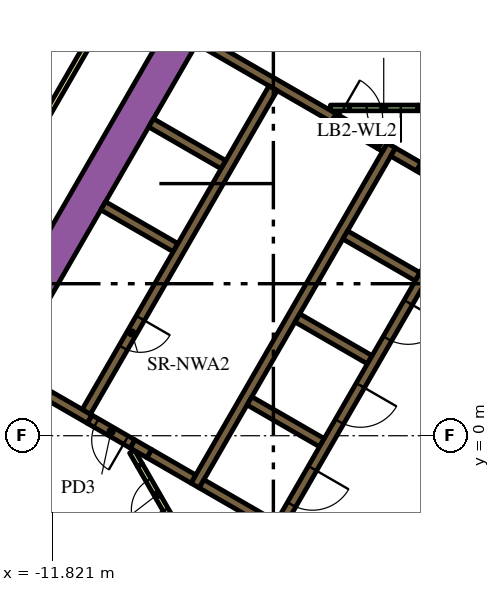
"""IFC4 building model, lengths in metres.
Left out: names, types, materials, properties, quantities, classifications, styles, units other than length and angle.
Written with IfcOpenShell. Run it as: python <this file> out.ifc"""

import sys

from ifc_helpers import new_model, si_unit, direction, frame, frame_2d, origin, place, context, subcontext, project, spatial, polyline, rectangle, outline, extrude, element, fill, save


model = new_model("IFC4")
c1 = context("Model", 3, precision=1e-05, world=origin(), true_north=direction((0.0, 1.0)))
c2 = subcontext(c1, "Body", "Model", "MODEL_VIEW")
j1 = project(units=[si_unit("LENGTHUNIT", "METRE"), si_unit("PLANEANGLEUNIT", "RADIAN")], contexts=[c1])
p1 = place(None, origin())
s1 = spatial("IfcSite", under=j1, at=p1, CompositionType="ELEMENT")
p2 = place(p1, origin())
s2 = spatial("IfcBuilding", under=s1, at=p2, CompositionType="ELEMENT")
p3 = place(p2, frame((0.0, 0.0, 126.6)))
s3 = spatial("IfcBuildingStorey", under=s2, at=p3, CompositionType="ELEMENT", Elevation=126.6)
p4 = place(p3, frame((-14.268, 0.387, 0.0), z_axis=(0.0, 0.0, 1.0), x_axis=(0.499994617707, 0.866028511231, 0.0)))
e1 = element("IfcWall", 1, at=p4, inside=s3, PredefinedType="SOLIDWALL", context=c2, shape_type="SweptSolid", body=[
    extrude(rectangle(XDim=18.817, YDim=0.9, at=frame_2d((9.409, 0.0))), origin(), (0.0, 0.0, 1.0), 3.9),
])
p5 = place(p3, frame((-8.06, -1.311, 0.0), z_axis=(0.0, 0.0, 1.0), x_axis=(0.50000273126, 0.866023826885, 0.0)))
e2 = element("IfcWall", 2, at=p5, inside=s3, PredefinedType="SOLIDWALL", context=c2, shape_type="SweptSolid", body=[
    extrude(rectangle(XDim=10.33, YDim=0.25, at=frame_2d((5.165, 0.0))), origin(), (0.0, 0.0, 1.0), 3.9),
])
p6 = place(p3, frame((-1.819, 6.87, 0.0), z_axis=(0.0, 0.0, 1.0), x_axis=(-0.866294599386, 0.499533449405, 0.0)))
e3 = element("IfcWall", 3, at=p6, inside=s3, PredefinedType="SOLIDWALL", context=c2, shape_type="SweptSolid", body=[
    extrude(rectangle(XDim=0.41, YDim=0.25, at=frame_2d((0.205, 0.0))), origin(), (0.0, 0.0, 1.0), 3.9),
])
p7 = place(p3, frame((-2.849, 7.465, 0.0), z_axis=(0.0, 0.0, 1.0), x_axis=(0.865955664968, -0.500120771724, 0.0)))
e4 = element("IfcWall", 4, at=p7, inside=s3, PredefinedType="SOLIDWALL", context=c2, shape_type="SweptSolid", body=[
    extrude(rectangle(XDim=0.778, YDim=0.25, at=frame_2d((0.389, 0.0))), origin(), (0.0, 0.0, 1.0), 3.9),
])
for number, where, z_axis, x_axis in (
    (5, (-2.204, 4.182, 0.0), (0.0, 0.0, 1.0), (-0.866, 0.5, 0.0)),
    (6, (-5.369, 3.1, 0.0), (0.0, 0.0, 1.0), (0.866, -0.5, 0.0)),
    (7, (-4.724, -0.182, 0.0), (0.0, 0.0, 1.0), (-0.866, 0.5, 0.0)),
):
    element("IfcWall", number, at=place(p3, frame(where, z_axis=z_axis, x_axis=x_axis)), inside=s3, PredefinedType="SOLIDWALL", context=c2, shape_type="SweptSolid", body=[
        extrude(rectangle(XDim=2.2, YDim=0.25, at=frame_2d((1.1, 0.0))), origin(), (0.0, 0.0, 1.0), 3.9),
    ])
p8 = place(p3, origin())
e8 = element("IfcWall", 8, at=p8, inside=s3, PredefinedType="SOLIDWALL", context=c2, shape_type="SweptSolid", body=[
    extrude(outline(polyline([(-5.922, -2.257), (-5.922, -2.257), (-5.705, -2.382), (-5.83, -2.598), (-6.418, -2.258), (-6.433, -2.153), (-6.433, -2.153), (-6.433, -2.153), (-6.508, -2.163), (-6.508, -2.163), (-6.508, -2.163), (-6.501, -2.21), (-7.952, -1.373), (-7.827, -1.156), (-5.922, -2.257)])), origin(), (0.0, 0.0, 1.0), 3.9),
])
p9 = place(p3, frame((-9.708, -0.215, 0.0), z_axis=(0.0, 0.0, 1.0), x_axis=(0.866113839764, -0.499846793097, 0.0)))
e9 = element("IfcWall", 9, at=p9, inside=s3, PredefinedType="SOLIDWALL", context=c2, shape_type="SweptSolid", body=[
    extrude(rectangle(XDim=0.51, YDim=0.25, at=frame_2d((0.255, 0.0))), origin(), (0.0, 0.0, 1.0), 3.9),
])
p10 = place(p3, frame((-12.999, 1.685, 0.0), z_axis=(0.0, 0.0, 1.0), x_axis=(0.865996765544, -0.500049599607, 0.0)))
e10 = element("IfcWall", 10, at=p10, inside=s3, PredefinedType="SOLIDWALL", context=c2, shape_type="SweptSolid", body=[
    extrude(rectangle(XDim=2.498, YDim=0.25, at=frame_2d((1.249, 0.0))), origin(), (0.0, 0.0, 1.0), 3.9),
])
p11 = place(p3, frame((-9.265, -0.471, 0.0), z_axis=(0.0, 0.0, 1.0), x_axis=(0.865954634268, -0.500122556369, 0.0)))
e11 = element("IfcWall", 11, at=p11, inside=s3, PredefinedType="SOLIDWALL", context=c2, shape_type="SweptSolid", body=[
    extrude(rectangle(XDim=1.338, YDim=0.25, at=frame_2d((0.669, 0.0))), origin(), (0.0, 0.0, 1.0), 3.9),
])
e12 = element("IfcWall", 12, at=p8, inside=s3, PredefinedType="SOLIDWALL", context=c2, shape_type="SweptSolid", body=[
    extrude(outline(polyline([(-3.128, 7.481), (-3.259, 7.557), (-3.134, 7.773), (-3.003, 7.698), (-3.128, 7.481)])), origin(), (0.0, 0.0, 1.0), 3.9),
])
for number, where, z_axis, x_axis in (
    (13, (-8.574, 4.95, 0.0), (0.0, 0.0, 1.0), (-0.866, 0.5, 0.0)),
    (14, (-7.314, 7.132, 0.0), (0.0, 0.0, 1.0), (-0.866, 0.5, 0.0)),
):
    element("IfcWall", number, at=place(p3, frame(where, z_axis=z_axis, x_axis=x_axis)), inside=s3, PredefinedType="SOLIDWALL", context=c2, shape_type="SweptSolid", body=[
        extrude(rectangle(XDim=2.2, YDim=0.25, at=frame_2d((1.1, 0.0))), origin(), (0.0, 0.0, 1.0), 3.9),
    ])
p12 = place(p3, frame((-7.959, 10.415, 0.0), z_axis=(0.0, 0.0, 1.0), x_axis=(0.866020958405, -0.500007699544, 0.0)))
e15 = element("IfcWall", 15, at=p12, inside=s3, PredefinedType="SOLIDWALL", context=c2, shape_type="SweptSolid", body=[
    extrude(rectangle(XDim=4.1, YDim=0.25, at=frame_2d((2.05, 0.0))), origin(), (0.0, 0.0, 1.0), 3.9),
])
p13 = place(p3, frame((-6.531, -2.689, 0.0), z_axis=(0.0, 0.0, 1.0), x_axis=(-0.499967446111, 0.866044197965, 0.0)))
e16 = element("IfcWall", 16, at=p13, inside=s3, PredefinedType="PARTITIONING", context=c2, shape_type="SweptSolid", body=[
    extrude(rectangle(XDim=0.748, YDim=0.15, at=frame_2d((0.374, 0.0))), origin(), (0.0, 0.0, 1.0), 2.75),
])
p14 = place(p3, frame((-9.512, -0.775, 0.0), z_axis=(0.0, 0.0, 1.0), x_axis=(-0.500080620599, 0.865978852456, 0.0)))
e17 = element("IfcWall", 17, at=p14, inside=s3, PredefinedType="PARTITIONING", context=c2, shape_type="SweptSolid", body=[
    extrude(rectangle(XDim=0.413, YDim=0.15, at=frame_2d((0.207, 0.0))), origin(), (0.0, 0.0, 1.0), 2.75),
])
p15 = place(p3, frame((-3.997, 8.625, 0.0), z_axis=(0.0, 0.0, 1.0), x_axis=(-1.0, 0.0, 0.0)))
e18 = element("IfcWall", 18, at=p15, inside=s3, PredefinedType="PARTITIONING", context=c2, shape_type="SweptSolid", body=[
    extrude(rectangle(XDim=0.502, YDim=0.15, at=frame_2d((0.251, 0.0))), origin(), (0.0, 0.0, 1.0), 2.75),
])
p16 = place(p3, frame((-2.196, 8.625, 0.0), z_axis=(0.0, 0.0, 1.0), x_axis=(1.0, 0.0, 0.0)))
e19 = element("IfcWall", 19, at=p16, inside=s3, PredefinedType="PARTITIONING", context=c2, shape_type="SweptSolid", body=[
    extrude(rectangle(XDim=1.146, YDim=0.15, at=frame_2d((0.573, 0.0))), origin(), (0.0, 0.0, 1.0), 2.75),
])
p17 = place(p3, frame((-6.008, 9.144, 0.0), z_axis=(0.0, 0.0, 1.0), x_axis=(-0.500006956611, -0.866021387346, 0.0)))
e20 = element("IfcWall", 20, at=p17, inside=s3, PredefinedType="SOLIDWALL", context=c2, shape_type="SweptSolid", body=[
    extrude(rectangle(XDim=9.83, YDim=0.25, at=frame_2d((4.915, 0.0))), origin(), (0.0, 0.0, 1.0), 3.9),
])
p18 = place(p17, frame((6.985, 0.0, 0.0)))
e21 = element("IfcOpeningElement", 21, at=p18, cuts=e20, PredefinedType="OPENING", context=c2, shape_type="SweptSolid", body=[
    extrude(rectangle(XDim=0.9, YDim=2.1, at=frame_2d((0.45, 1.05))), frame((0.0, 0.135, 0.0), z_axis=(0.0, -1.0, 0.0), x_axis=(1.0, 0.0, 0.0)), (0.0, 0.0, 1.0), 0.27),
])
p19 = place(p3, frame((-0.898, 6.194, 0.0), z_axis=(0.0, 0.0, 1.0), x_axis=(-0.499996202215, -0.866027596426, 0.0)))
e22 = element("IfcWall", 22, at=p19, inside=s3, PredefinedType="SOLIDWALL", context=c2, shape_type="SweptSolid", body=[
    extrude(rectangle(XDim=9.83, YDim=0.25, at=frame_2d((4.915, 0.0))), origin(), (0.0, 0.0, 1.0), 3.9),
])
p20 = place(p19, frame((0.585, 0.0, 0.0)))
e23 = element("IfcOpeningElement", 23, at=p20, cuts=e22, PredefinedType="OPENING", context=c2, shape_type="SweptSolid", body=[
    extrude(rectangle(XDim=1.1, YDim=2.1, at=frame_2d((0.55, 1.05))), frame((0.0, 0.135, 0.0), z_axis=(0.0, -1.0, 0.0), x_axis=(1.0, 0.0, 0.0)), (0.0, 0.0, 1.0), 0.27),
])
p21 = place(p19, frame((3.105, 0.0, 0.0)))
e24 = element("IfcOpeningElement", 24, at=p21, cuts=e22, PredefinedType="OPENING", context=c2, shape_type="SweptSolid", body=[
    extrude(rectangle(XDim=1.1, YDim=2.1, at=frame_2d((0.55, 1.05))), frame((0.0, 0.135, 0.0), z_axis=(0.0, -1.0, 0.0), x_axis=(1.0, 0.0, 0.0)), (0.0, 0.0, 1.0), 0.27),
])
p22 = place(p19, frame((5.625, 0.0, 0.0)))
e25 = element("IfcOpeningElement", 25, at=p22, cuts=e22, PredefinedType="OPENING", context=c2, shape_type="SweptSolid", body=[
    extrude(rectangle(XDim=1.1, YDim=2.1, at=frame_2d((0.55, 1.05))), frame((0.0, 0.135, 0.0), z_axis=(0.0, -1.0, 0.0), x_axis=(1.0, 0.0, 0.0)), (0.0, 0.0, 1.0), 0.27),
])
p23 = place(p19, frame((8.145, 0.0, 0.0)))
e26 = element("IfcOpeningElement", 26, at=p23, cuts=e22, PredefinedType="OPENING", context=c2, shape_type="SweptSolid", body=[
    extrude(rectangle(XDim=1.1, YDim=2.1, at=frame_2d((0.55, 1.05))), frame((0.0, 0.135, 0.0), z_axis=(0.0, -1.0, 0.0), x_axis=(1.0, 0.0, 0.0)), (0.0, 0.0, 1.0), 0.27),
])
p24 = place(p3, frame((-2.196, 8.625, 0.0), z_axis=(0.0, 0.0, 1.0), x_axis=(-1.0, 0.0, 0.0)))
e27 = element("IfcWall", 27, at=p24, inside=s3, PredefinedType="PARTITIONING", context=c2, shape_type="SweptSolid", body=[
    extrude(rectangle(XDim=1.8, YDim=0.15, at=frame_2d((0.9, 0.0))), origin(), (0.0, 0.0, 1.0), 2.75),
])
p25 = place(p24, frame((0.45, 0.0, 0.0)))
e28 = element("IfcOpeningElement", 28, at=p25, cuts=e27, PredefinedType="OPENING", context=c2, shape_type="SweptSolid", body=[
    extrude(rectangle(XDim=0.9, YDim=2.1, at=frame_2d((0.45, 1.05))), frame((0.0, 0.085, 0.0), z_axis=(0.0, -1.0, 0.0), x_axis=(1.0, 0.0, 0.0)), (0.0, 0.0, 1.0), 0.17),
])
p26 = place(p3, frame((-9.708, -0.215, 0.0), z_axis=(0.0, 0.0, 1.0), x_axis=(-0.866004217611, 0.500036693733, 0.0)))
e29 = element("IfcWall", 29, at=p26, inside=s3, PredefinedType="SOLIDWALL", context=c2, shape_type="SweptSolid", body=[
    extrude(rectangle(XDim=1.3, YDim=0.25, at=frame_2d((0.65, 0.0))), origin(), (0.0, 0.0, 1.0), 3.9),
])
p27 = place(p26, frame((0.2, 0.0, 0.0)))
e30 = element("IfcOpeningElement", 30, at=p27, cuts=e29, PredefinedType="OPENING", context=c2, shape_type="SweptSolid", body=[
    extrude(rectangle(XDim=0.9, YDim=2.1, at=frame_2d((0.45, 1.05))), frame((0.0, 0.135, 0.0), z_axis=(0.0, -1.0, 0.0), x_axis=(1.0, 0.0, 0.0)), (0.0, 0.0, 1.0), 0.27),
])
p28 = place(p3, frame((-4.409, 8.365, 0.0), z_axis=(0.0, 0.0, 1.0), x_axis=(0.866034573852, -0.49998411664, 0.0)))
e31 = element("IfcWall", 31, at=p28, inside=s3, PredefinedType="SOLIDWALL", context=c2, shape_type="SweptSolid", body=[
    extrude(rectangle(XDim=1.4, YDim=0.25, at=frame_2d((0.7, 0.0))), origin(), (0.0, 0.0, 1.0), 3.9),
])
p29 = place(p28, frame((0.1, 0.0, 0.0)))
e32 = element("IfcOpeningElement", 32, at=p29, cuts=e31, PredefinedType="OPENING", context=c2, shape_type="SweptSolid", body=[
    extrude(rectangle(XDim=1.2, YDim=2.1, at=frame_2d((0.6, 1.05))), frame((0.0, 0.135, 0.0), z_axis=(0.0, -1.0, 0.0), x_axis=(1.0, 0.0, 0.0)), (0.0, 0.0, 1.0), 0.27),
])
p30 = place(p3, frame((-8.612, -2.333, 0.0), z_axis=(0.0, 0.0, 1.0), x_axis=(-0.499961193289, 0.866047807691, 0.0)))
e33 = element("IfcWall", 33, at=p30, inside=s3, PredefinedType="PARTITIONING", context=c2, shape_type="SweptSolid", body=[
    extrude(rectangle(XDim=1.8, YDim=0.15, at=frame_2d((0.9, 0.0))), origin(), (0.0, 0.0, 1.0), 2.75),
])
p31 = place(p30, frame((0.45, 0.0, 0.0)))
e34 = element("IfcOpeningElement", 34, at=p31, cuts=e33, PredefinedType="OPENING", context=c2, shape_type="SweptSolid", body=[
    extrude(rectangle(XDim=0.9, YDim=2.1, at=frame_2d((0.45, 1.05))), frame((0.0, 0.085, 0.0), z_axis=(0.0, -1.0, 0.0), x_axis=(1.0, 0.0, 0.0)), (0.0, 0.0, 1.0), 0.17),
])
p32 = place(p3, frame((-19.081, -3.9, 0.0), z_axis=(0.0, 0.0, 1.0), x_axis=(0.499998313975, 0.866026377209, 0.0)))
e35 = element("IfcWall", 35, at=p32, inside=s3, PredefinedType="PARTITIONING", context=c2, shape_type="SweptSolid", body=[
    extrude(rectangle(XDim=25.766, YDim=0.15, at=frame_2d((12.883, 0.0))), origin(), (0.0, 0.0, 1.0), 2.75),
])
p33 = place(p32, frame((19.306, 0.0, 0.0)))
e36 = element("IfcOpeningElement", 36, at=p33, cuts=e35, PredefinedType="OPENING", context=c2, shape_type="SweptSolid", body=[
    extrude(rectangle(XDim=1.0, YDim=2.1, at=frame_2d((0.5, 1.05))), frame((0.0, 0.085, 0.0), z_axis=(0.0, -1.0, 0.0), x_axis=(1.0, 0.0, 0.0)), (0.0, 0.0, 1.0), 0.17),
])
p34 = place(p32, frame((18.0, 0.0, 0.0)))
e37 = element("IfcOpeningElement", 37, at=p34, cuts=e35, PredefinedType="OPENING", context=c2, shape_type="SweptSolid", body=[
    extrude(rectangle(XDim=1.0, YDim=2.1, at=frame_2d((0.5, 1.05))), frame((0.0, 0.085, 0.0), z_axis=(0.0, -1.0, 0.0), x_axis=(1.0, 0.0, 0.0)), (0.0, 0.0, 1.0), 0.17),
])
p35 = place(p32, frame((7.793, 0.0, 0.0)))
e38 = element("IfcOpeningElement", 38, at=p35, cuts=e35, PredefinedType="OPENING", context=c2, shape_type="SweptSolid", body=[
    extrude(rectangle(XDim=0.9, YDim=2.1, at=frame_2d((0.45, 1.05))), frame((0.0, 0.085, 0.0), z_axis=(0.0, -1.0, 0.0), x_axis=(1.0, 0.0, 0.0)), (0.0, 0.0, 1.0), 0.17),
])
p36 = place(p32, frame((4.674, 0.0, 0.0)))
e39 = element("IfcOpeningElement", 39, at=p36, cuts=e35, PredefinedType="OPENING", context=c2, shape_type="SweptSolid", body=[
    extrude(rectangle(XDim=0.9, YDim=2.1, at=frame_2d((0.45, 1.05))), frame((0.0, 0.085, 0.0), z_axis=(0.0, -1.0, 0.0), x_axis=(1.0, 0.0, 0.0)), (0.0, 0.0, 1.0), 0.17),
])
p37 = place(p32, frame((0.18, 0.0, 0.0)))
e40 = element("IfcOpeningElement", 40, at=p37, cuts=e35, PredefinedType="OPENING", context=c2, shape_type="SweptSolid", body=[
    extrude(rectangle(XDim=1.0, YDim=2.1, at=frame_2d((0.5, 1.05))), frame((0.0, 0.085, 0.0), z_axis=(0.0, -1.0, 0.0), x_axis=(1.0, 0.0, 0.0)), (0.0, 0.0, 1.0), 0.17),
])
p38 = place(p18, origin())
e41 = element("IfcDoor", 41, at=p38, inside=s3, OperationType="SINGLE_SWING_LEFT", PredefinedType="DOOR", context=c2, shape_type="SweptSolid", body=[
    extrude(rectangle(XDim=0.9, YDim=2.1, at=frame_2d((0.45, 1.05))), frame((0.0, 0.025, 0.0), z_axis=(0.0, -1.0, 0.0), x_axis=(1.0, 0.0, 0.0)), (0.0, 0.0, 1.0), 0.05),
])
fill(e21, e41)
p39 = place(p21, origin())
e42 = element("IfcDoor", 42, at=p39, inside=s3, OperationType="DOUBLE_DOOR_SLIDING", PredefinedType="DOOR", context=c2, shape_type="SweptSolid", body=[
    extrude(rectangle(XDim=1.1, YDim=2.1, at=frame_2d((0.55, 1.05))), frame((0.0, 0.025, 0.0), z_axis=(0.0, -1.0, 0.0), x_axis=(1.0, 0.0, 0.0)), (0.0, 0.0, 1.0), 0.05),
])
fill(e24, e42)
p40 = place(p22, origin())
e43 = element("IfcDoor", 43, at=p40, inside=s3, OperationType="DOUBLE_DOOR_SLIDING", PredefinedType="DOOR", context=c2, shape_type="SweptSolid", body=[
    extrude(rectangle(XDim=1.1, YDim=2.1, at=frame_2d((0.55, 1.05))), frame((0.0, 0.025, 0.0), z_axis=(0.0, -1.0, 0.0), x_axis=(1.0, 0.0, 0.0)), (0.0, 0.0, 1.0), 0.05),
])
fill(e25, e43)
p41 = place(p23, origin())
e44 = element("IfcDoor", 44, at=p41, inside=s3, OperationType="DOUBLE_DOOR_SLIDING", PredefinedType="DOOR", context=c2, shape_type="SweptSolid", body=[
    extrude(rectangle(XDim=1.1, YDim=2.1, at=frame_2d((0.55, 1.05))), frame((0.0, 0.025, 0.0), z_axis=(0.0, -1.0, 0.0), x_axis=(1.0, 0.0, 0.0)), (0.0, 0.0, 1.0), 0.05),
])
fill(e26, e44)
p42 = place(p25, origin())
e45 = element("IfcDoor", 45, at=p42, inside=s3, OperationType="SINGLE_SWING_LEFT", PredefinedType="DOOR", context=c2, shape_type="SweptSolid", body=[
    extrude(rectangle(XDim=0.9, YDim=2.1, at=frame_2d((0.45, 1.05))), frame((0.0, 0.025, 0.0), z_axis=(0.0, -1.0, 0.0), x_axis=(1.0, 0.0, 0.0)), (0.0, 0.0, 1.0), 0.05),
])
fill(e28, e45)
p43 = place(p27, origin())
e46 = element("IfcDoor", 46, at=p43, inside=s3, OperationType="SINGLE_SWING_LEFT", PredefinedType="DOOR", context=c2, shape_type="SweptSolid", body=[
    extrude(rectangle(XDim=0.9, YDim=2.1, at=frame_2d((0.45, 1.05))), frame((0.0, 0.025, 0.0), z_axis=(0.0, -1.0, 0.0), x_axis=(1.0, 0.0, 0.0)), (0.0, 0.0, 1.0), 0.05),
])
fill(e30, e46)
p44 = place(p29, origin())
e47 = element("IfcDoor", 47, at=p44, inside=s3, OperationType="SINGLE_SWING_LEFT", PredefinedType="DOOR", context=c2, shape_type="SweptSolid", body=[
    extrude(rectangle(XDim=1.2, YDim=2.1, at=frame_2d((0.6, 1.05))), frame((0.0, 0.025, 0.0), z_axis=(0.0, -1.0, 0.0), x_axis=(1.0, 0.0, 0.0)), (0.0, 0.0, 1.0), 0.05),
])
fill(e32, e47)
p45 = place(p31, origin())
e48 = element("IfcDoor", 48, at=p45, inside=s3, OperationType="SINGLE_SWING_LEFT", PredefinedType="DOOR", context=c2, shape_type="SweptSolid", body=[
    extrude(rectangle(XDim=0.9, YDim=2.1, at=frame_2d((0.45, 1.05))), frame((0.0, 0.025, 0.0), z_axis=(0.0, -1.0, 0.0), x_axis=(1.0, 0.0, 0.0)), (0.0, 0.0, 1.0), 0.05),
])
fill(e34, e48)
save(model, sys.argv[1])
